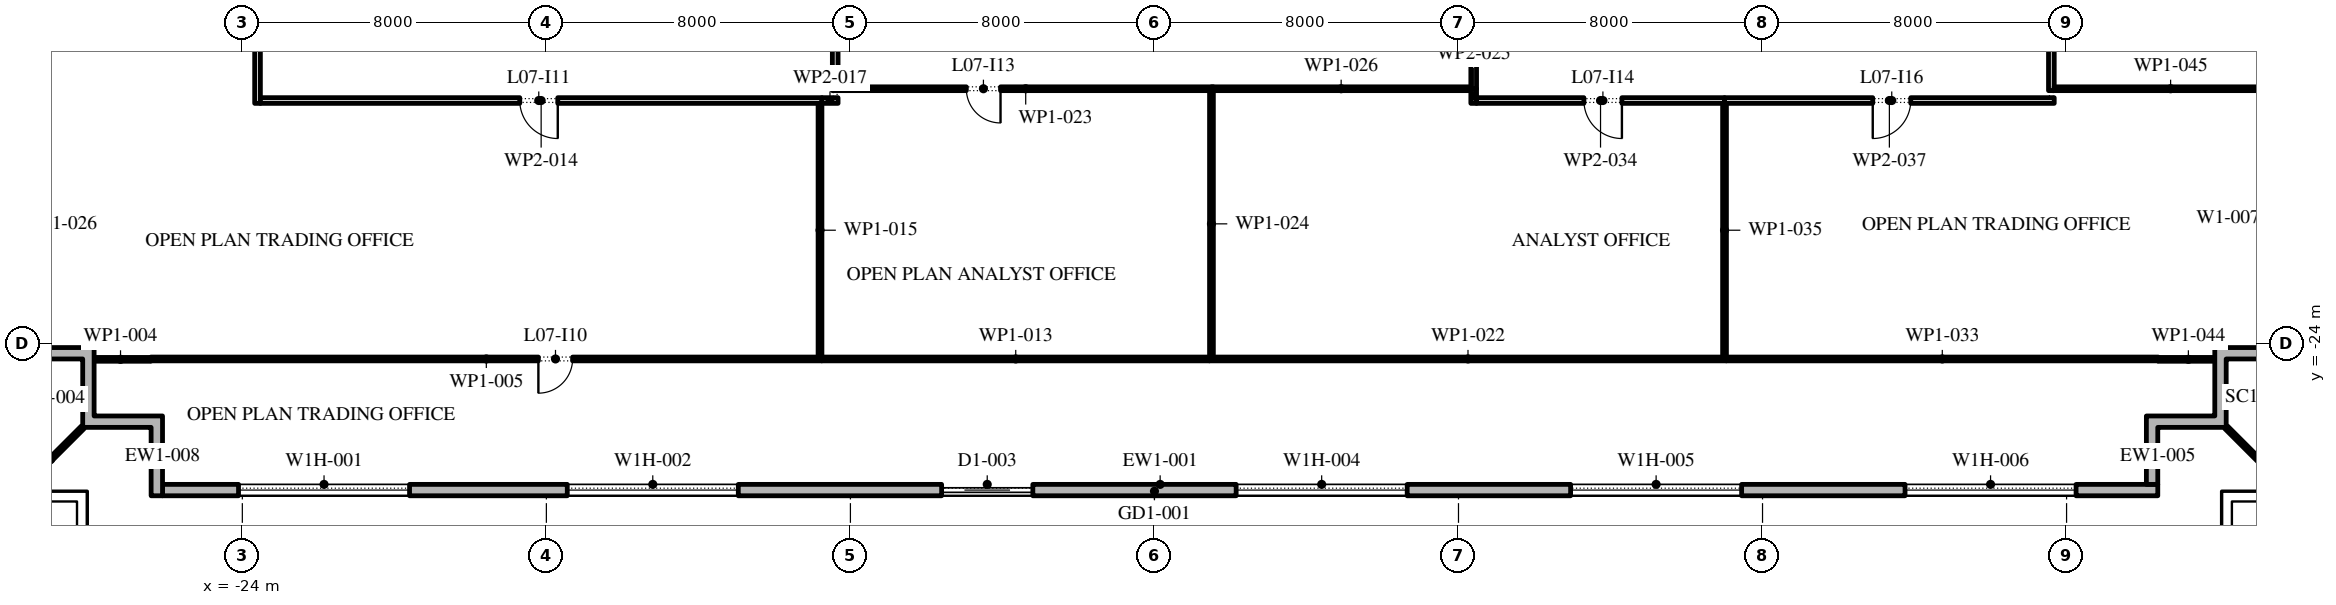
"""IFC4 building model, lengths in metres.
Left out: names, types, materials, properties, quantities, classifications, styles, units other than length and angle.
Written with IfcOpenShell. Run it as: python <this file> out.ifc"""

import sys

from ifc_helpers import new_model, si_unit, direction, frame, frame_2d, origin, place, context, subcontext, project, spatial, polyline, rectangle, outline, extrude, element, fill, save


model = new_model("IFC4")
c1 = context("Model", 3, precision=1e-05, world=origin(), true_north=direction((0.0, 1.0)))
c2 = subcontext(c1, "Body", "Model", "MODEL_VIEW")
j1 = project(units=[si_unit("LENGTHUNIT", "METRE"), si_unit("PLANEANGLEUNIT", "RADIAN")], contexts=[c1])
p1 = place(None, origin())
s1 = spatial("IfcSite", under=j1, at=p1, CompositionType="ELEMENT")
p2 = place(p1, origin())
s2 = spatial("IfcBuilding", under=s1, at=p2, CompositionType="ELEMENT")
p3 = place(p2, frame((0.0, 0.0, 39.6)))
s3 = spatial("IfcBuildingStorey", under=s2, at=p3, CompositionType="ELEMENT", Elevation=39.6)
p4 = place(p3, frame((-26.1, -27.85, 0.0), z_axis=(0.0, 0.0, 1.0), x_axis=(1.0, 0.0, 0.0)))
e1 = element("IfcWall", 1, at=p4, inside=s3, PredefinedType="STANDARD", context=c2, shape_type="SweptSolid", body=[
    extrude(rectangle(XDim=52.5, YDim=0.3, at=frame_2d((26.25, 0.0))), origin(), (0.0, 0.0, 1.0), 4.0),
])
p5 = place(p4, frame((2.0, 0.0, 0.45)))
e2 = element("IfcOpeningElement", 2, at=p5, cuts=e1, PredefinedType="OPENING", context=c2, shape_type="SweptSolid", body=[
    extrude(rectangle(XDim=4.5, YDim=2.75, at=frame_2d((2.25, 1.375))), frame((0.0, 0.16, 0.0), z_axis=(0.0, -1.0, 0.0), x_axis=(1.0, 0.0, 0.0)), (0.0, 0.0, 1.0), 0.32),
])
p6 = place(p4, frame((10.65, 0.0, 0.45)))
e3 = element("IfcOpeningElement", 3, at=p6, cuts=e1, PredefinedType="OPENING", context=c2, shape_type="SweptSolid", body=[
    extrude(rectangle(XDim=4.5, YDim=2.75, at=frame_2d((2.25, 1.375))), frame((0.0, 0.16, 0.0), z_axis=(0.0, -1.0, 0.0), x_axis=(1.0, 0.0, 0.0)), (0.0, 0.0, 1.0), 0.32),
])
p7 = place(p4, frame((20.5, 0.0, 0.0)))
e4 = element("IfcOpeningElement", 4, at=p7, cuts=e1, PredefinedType="OPENING", context=c2, shape_type="SweptSolid", body=[
    extrude(rectangle(XDim=2.4, YDim=3.5, at=frame_2d((1.2, 1.75))), frame((0.0, 0.16, 0.0), z_axis=(0.0, -1.0, 0.0), x_axis=(1.0, 0.0, 0.0)), (0.0, 0.0, 1.0), 0.32),
])
p8 = place(p4, frame((28.25, 0.0, 0.45)))
e5 = element("IfcOpeningElement", 5, at=p8, cuts=e1, PredefinedType="OPENING", context=c2, shape_type="SweptSolid", body=[
    extrude(rectangle(XDim=4.5, YDim=2.75, at=frame_2d((2.25, 1.375))), frame((0.0, 0.16, 0.0), z_axis=(0.0, -1.0, 0.0), x_axis=(1.0, 0.0, 0.0)), (0.0, 0.0, 1.0), 0.32),
])
p9 = place(p4, frame((37.05, 0.0, 0.45)))
e6 = element("IfcOpeningElement", 6, at=p9, cuts=e1, PredefinedType="OPENING", context=c2, shape_type="SweptSolid", body=[
    extrude(rectangle(XDim=4.5, YDim=2.75, at=frame_2d((2.25, 1.375))), frame((0.0, 0.16, 0.0), z_axis=(0.0, -1.0, 0.0), x_axis=(1.0, 0.0, 0.0)), (0.0, 0.0, 1.0), 0.32),
])
p10 = place(p4, frame((45.85, 0.0, 0.45)))
e7 = element("IfcOpeningElement", 7, at=p10, cuts=e1, PredefinedType="OPENING", context=c2, shape_type="SweptSolid", body=[
    extrude(rectangle(XDim=4.5, YDim=2.75, at=frame_2d((2.25, 1.375))), frame((0.0, 0.16, 0.0), z_axis=(0.0, -1.0, 0.0), x_axis=(1.0, 0.0, 0.0)), (0.0, 0.0, 1.0), 0.32),
])
p11 = place(p3, origin())
e8 = element("IfcWall", 8, at=p11, inside=s3, PredefinedType="STANDARD", context=c2, shape_type="SweptSolid", body=[
    extrude(outline(polyline([(27.9, -25.9), (27.9, -24.1), (30.0, -24.1), (30.0, -24.4), (28.2, -24.4), (28.2, -26.2), (26.4, -26.2), (26.4, -27.7), (26.1, -27.7), (26.1, -25.9), (27.9, -25.9)])), origin(), (0.0, 0.0, 1.0), 4.0),
])
p12 = place(p3, origin())
e9 = element("IfcWall", 9, at=p12, inside=s3, PredefinedType="STANDARD", context=c2, shape_type="SweptSolid", body=[
    extrude(outline(polyline([(-26.4, -26.2), (-28.2, -26.2), (-28.2, -24.4), (-29.7, -24.4), (-29.7, -24.1), (-27.9, -24.1), (-27.9, -25.9), (-26.1, -25.9), (-26.1, -28.0), (-26.4, -28.0), (-26.4, -26.2)])), origin(), (0.0, 0.0, 1.0), 4.0),
])
for number, where, z_axis, x_axis in (
    (10, (28.2, -26.2, -0.05), (0.0, 0.0, 1.0), (0.707, -0.707, 0.0)),
    (11, (-28.2, -26.2, -0.05), (0.0, 0.0, 1.0), (-0.707, -0.707, 0.0)),
):
    element("IfcWall", number, at=place(p3, frame(where, z_axis=z_axis, x_axis=x_axis)), inside=s3, PredefinedType="STANDARD", context=c2, shape_type="SweptSolid", body=[
        extrude(rectangle(XDim=2.385, YDim=0.1, at=frame_2d((1.192, 0.0))), origin(), (0.0, 0.0, 1.0), 4.05),
    ])
p13 = place(p3, frame((-28.0, -24.41, 0.0), z_axis=(0.0, 0.0, 1.0), x_axis=(1.0, 0.0, 0.0)))
e12 = element("IfcWall", 12, at=p13, inside=s3, PredefinedType="PARTITIONING", context=c2, shape_type="SweptSolid", body=[
    extrude(rectangle(XDim=1.59, YDim=0.1, at=frame_2d((0.795, 0.0))), origin(), (0.0, 0.0, 1.0), 4.0),
])
p14 = place(p3, frame((-26.41, -24.4, 0.0), z_axis=(0.0, 0.0, 1.0), x_axis=(1.0, 0.0, 0.0)))
e13 = element("IfcWall", 13, at=p14, inside=s3, PredefinedType="PARTITIONING", context=c2, shape_type="SweptSolid", body=[
    extrude(rectangle(XDim=17.66, YDim=0.1, at=frame_2d((8.83, 0.0))), origin(), (0.0, 0.0, 1.0), 4.0),
])
p15 = place(p14, frame((10.2, 0.0, 0.0)))
e14 = element("IfcOpeningElement", 14, at=p15, cuts=e13, PredefinedType="OPENING", context=c2, shape_type="SweptSolid", body=[
    extrude(rectangle(XDim=0.9, YDim=2.1, at=frame_2d((0.45, 1.05))), frame((0.0, 0.06, 0.0), z_axis=(0.0, -1.0, 0.0), x_axis=(1.0, 0.0, 0.0)), (0.0, 0.0, 1.0), 0.12),
])
p16 = place(p3, frame((-23.6, -17.675, 0.0), z_axis=(0.0, 0.0, 1.0), x_axis=(0.0, 1.0, 0.0)))
e15 = element("IfcWall", 15, at=p16, inside=s3, PredefinedType="PARTITIONING", context=c2, shape_type="SweptSolid", body=[
    extrude(rectangle(XDim=7.555, YDim=0.15, at=frame_2d((3.777, 0.0))), origin(), (0.0, 0.0, 1.0), 4.0),
])
p17 = place(p3, frame((-8.75, -24.4, 0.0), z_axis=(0.0, 0.0, 1.0), x_axis=(1.0, 0.0, 0.0)))
e16 = element("IfcWall", 16, at=p17, inside=s3, PredefinedType="PARTITIONING", context=c2, shape_type="SweptSolid", body=[
    extrude(rectangle(XDim=10.2, YDim=0.1, at=frame_2d((5.1, 0.0))), origin(), (0.0, 0.0, 1.0), 4.0),
])
p18 = place(p3, frame((-8.75, -17.6, 0.0), z_axis=(0.0, 0.0, 1.0), x_axis=(-1.0, 0.0, 0.0)))
e17 = element("IfcWall", 17, at=p18, inside=s3, PredefinedType="PARTITIONING", context=c2, shape_type="SweptSolid", body=[
    extrude(rectangle(XDim=14.775, YDim=0.15, at=frame_2d((7.387, 0.0))), origin(), (0.0, 0.0, 1.0), 4.0),
])
p19 = place(p18, frame((6.95, 0.0, 0.0)))
e18 = element("IfcOpeningElement", 18, at=p19, cuts=e17, PredefinedType="OPENING", context=c2, shape_type="SweptSolid", body=[
    extrude(rectangle(XDim=1.0, YDim=2.1, at=frame_2d((0.5, 1.05))), frame((0.0, 0.085, 0.0), z_axis=(0.0, -1.0, 0.0), x_axis=(1.0, 0.0, 0.0)), (0.0, 0.0, 1.0), 0.17),
])
p20 = place(p3, frame((-8.8, -17.675, 0.0), z_axis=(0.0, 0.0, 1.0), x_axis=(0.0, -1.0, 0.0)))
e19 = element("IfcWall", 19, at=p20, inside=s3, PredefinedType="PARTITIONING", context=c2, shape_type="SweptSolid", body=[
    extrude(rectangle(XDim=6.675, YDim=0.1, at=frame_2d((3.337, 0.0))), origin(), (0.0, 0.0, 1.0), 4.0),
])
p21 = place(p3, frame((-8.325, -17.6, 0.0), z_axis=(0.0, 0.0, 1.0), x_axis=(-1.0, 0.0, 0.0)))
e20 = element("IfcWall", 20, at=p21, inside=s3, PredefinedType="PARTITIONING", context=c2, shape_type="SweptSolid", body=[
    extrude(rectangle(XDim=0.425, YDim=0.15, at=frame_2d((0.212, 0.0))), origin(), (0.0, 0.0, 1.0), 4.0),
])
p22 = place(p3, frame((-8.4, -10.12, 0.0), z_axis=(0.0, 0.0, 1.0), x_axis=(0.0, -1.0, 0.0)))
e21 = element("IfcWall", 21, at=p22, inside=s3, PredefinedType="PARTITIONING", context=c2, shape_type="SweptSolid", body=[
    extrude(rectangle(XDim=7.22, YDim=0.15, at=frame_2d((3.61, 0.0))), origin(), (0.0, 0.0, 1.0), 4.0),
])
p23 = place(p22, frame((4.52, 0.0, 0.0)))
e22 = element("IfcOpeningElement", 22, at=p23, cuts=e21, PredefinedType="OPENING", context=c2, shape_type="SweptSolid", body=[
    extrude(rectangle(XDim=1.0, YDim=2.1, at=frame_2d((0.5, 1.05))), frame((0.0, 0.085, 0.0), z_axis=(0.0, -1.0, 0.0), x_axis=(1.0, 0.0, 0.0)), (0.0, 0.0, 1.0), 0.17),
])
p24 = place(p3, frame((1.45, -24.4, 0.0), z_axis=(0.0, 0.0, 1.0), x_axis=(1.0, 0.0, 0.0)))
e23 = element("IfcWall", 23, at=p24, inside=s3, PredefinedType="PARTITIONING", context=c2, shape_type="SweptSolid", body=[
    extrude(rectangle(XDim=13.6, YDim=0.1, at=frame_2d((6.8, 0.0))), origin(), (0.0, 0.0, 1.0), 4.0),
])
p25 = place(p3, frame((1.55, -17.29, 0.0), z_axis=(0.0, 0.0, 1.0), x_axis=(-1.0, 0.0, 0.0)))
e24 = element("IfcWall", 24, at=p25, inside=s3, PredefinedType="PARTITIONING", context=c2, shape_type="SweptSolid", body=[
    extrude(rectangle(XDim=9.875, YDim=0.1, at=frame_2d((4.938, 0.0))), origin(), (0.0, 0.0, 1.0), 4.0),
])
p26 = place(p25, frame((5.6, 0.0, 0.0)))
e25 = element("IfcOpeningElement", 25, at=p26, cuts=e24, PredefinedType="OPENING", context=c2, shape_type="SweptSolid", body=[
    extrude(rectangle(XDim=0.9, YDim=2.1, at=frame_2d((0.45, 1.05))), frame((0.0, 0.06, 0.0), z_axis=(0.0, -1.0, 0.0), x_axis=(1.0, 0.0, 0.0)), (0.0, 0.0, 1.0), 0.12),
])
p27 = place(p3, frame((1.5, -17.34, 0.0), z_axis=(0.0, 0.0, 1.0), x_axis=(0.0, -1.0, 0.0)))
e26 = element("IfcWall", 26, at=p27, inside=s3, PredefinedType="PARTITIONING", context=c2, shape_type="SweptSolid", body=[
    extrude(rectangle(XDim=7.01, YDim=0.1, at=frame_2d((3.505, 0.0))), origin(), (0.0, 0.0, 1.0), 4.0),
])
p28 = place(p3, frame((8.4, -17.675, 0.0), z_axis=(0.0, 0.0, 1.0), x_axis=(0.0, 1.0, 0.0)))
e27 = element("IfcWall", 27, at=p28, inside=s3, PredefinedType="PARTITIONING", context=c2, shape_type="SweptSolid", body=[
    extrude(rectangle(XDim=0.385, YDim=0.15, at=frame_2d((0.192, 0.0))), origin(), (0.0, 0.0, 1.0), 4.0),
])
p29 = place(p3, frame((8.325, -17.29, 0.0), z_axis=(0.0, 0.0, 1.0), x_axis=(-1.0, 0.0, 0.0)))
e28 = element("IfcWall", 28, at=p29, inside=s3, PredefinedType="PARTITIONING", context=c2, shape_type="SweptSolid", body=[
    extrude(rectangle(XDim=6.825, YDim=0.1, at=frame_2d((3.413, 0.0))), origin(), (0.0, 0.0, 1.0), 4.0),
])
p30 = place(p3, frame((8.4, -17.29, 0.0), z_axis=(0.0, 0.0, 1.0), x_axis=(0.0, 1.0, 0.0)))
e29 = element("IfcWall", 29, at=p30, inside=s3, PredefinedType="PARTITIONING", context=c2, shape_type="SweptSolid", body=[
    extrude(rectangle(XDim=7.17, YDim=0.15, at=frame_2d((3.585, 0.0))), origin(), (0.0, 0.0, 1.0), 4.0),
])
p31 = place(p3, frame((15.05, -24.4, 0.0), z_axis=(0.0, 0.0, 1.0), x_axis=(1.0, 0.0, 0.0)))
e30 = element("IfcWall", 30, at=p31, inside=s3, PredefinedType="PARTITIONING", context=c2, shape_type="SweptSolid", body=[
    extrude(rectangle(XDim=11.36, YDim=0.1, at=frame_2d((5.68, 0.0))), origin(), (0.0, 0.0, 1.0), 4.0),
])
p32 = place(p3, frame((15.0, -17.6, 0.0), z_axis=(0.0, 0.0, 1.0), x_axis=(-1.0, 0.0, 0.0)))
e31 = element("IfcWall", 31, at=p32, inside=s3, PredefinedType="PARTITIONING", context=c2, shape_type="SweptSolid", body=[
    extrude(rectangle(XDim=6.525, YDim=0.15, at=frame_2d((3.262, 0.0))), origin(), (0.0, 0.0, 1.0), 4.0),
])
p33 = place(p32, frame((2.7, 0.0, 0.0)))
e32 = element("IfcOpeningElement", 32, at=p33, cuts=e31, PredefinedType="OPENING", context=c2, shape_type="SweptSolid", body=[
    extrude(rectangle(XDim=1.0, YDim=2.1, at=frame_2d((0.5, 1.05))), frame((0.0, 0.085, 0.0), z_axis=(0.0, -1.0, 0.0), x_axis=(1.0, 0.0, 0.0)), (0.0, 0.0, 1.0), 0.17),
])
p34 = place(p3, frame((15.0, -17.675, 0.0), z_axis=(0.0, 0.0, 1.0), x_axis=(0.0, -1.0, 0.0)))
e33 = element("IfcWall", 33, at=p34, inside=s3, PredefinedType="PARTITIONING", context=c2, shape_type="SweptSolid", body=[
    extrude(rectangle(XDim=6.675, YDim=0.1, at=frame_2d((3.337, 0.0))), origin(), (0.0, 0.0, 1.0), 4.0),
])
p35 = place(p3, frame((23.675, -17.6, 0.0), z_axis=(0.0, 0.0, 1.0), x_axis=(-1.0, 0.0, 0.0)))
e34 = element("IfcWall", 34, at=p35, inside=s3, PredefinedType="PARTITIONING", context=c2, shape_type="SweptSolid", body=[
    extrude(rectangle(XDim=8.675, YDim=0.15, at=frame_2d((4.337, 0.0))), origin(), (0.0, 0.0, 1.0), 4.0),
])
p36 = place(p35, frame((3.775, 0.0, 0.0)))
e35 = element("IfcOpeningElement", 35, at=p36, cuts=e34, PredefinedType="OPENING", context=c2, shape_type="SweptSolid", body=[
    extrude(rectangle(XDim=1.0, YDim=2.1, at=frame_2d((0.5, 1.05))), frame((0.0, 0.085, 0.0), z_axis=(0.0, -1.0, 0.0), x_axis=(1.0, 0.0, 0.0)), (0.0, 0.0, 1.0), 0.17),
])
p37 = place(p3, frame((23.6, -10.22, 0.0), z_axis=(0.0, 0.0, 1.0), x_axis=(0.0, -1.0, 0.0)))
e36 = element("IfcWall", 36, at=p37, inside=s3, PredefinedType="PARTITIONING", context=c2, shape_type="SweptSolid", body=[
    extrude(rectangle(XDim=7.12, YDim=0.15, at=frame_2d((3.56, 0.0))), origin(), (0.0, 0.0, 1.0), 4.0),
])
p38 = place(p37, frame((2.42, 0.0, 0.0)))
e37 = element("IfcOpeningElement", 37, at=p38, cuts=e36, PredefinedType="OPENING", context=c2, shape_type="SweptSolid", body=[
    extrude(rectangle(XDim=1.0, YDim=2.1, at=frame_2d((0.5, 1.05))), frame((0.0, 0.085, 0.0), z_axis=(0.0, -1.0, 0.0), x_axis=(1.0, 0.0, 0.0)), (0.0, 0.0, 1.0), 0.17),
])
p39 = place(p3, frame((26.41, -24.41, 0.0), z_axis=(0.0, 0.0, 1.0), x_axis=(1.0, 0.0, 0.0)))
e38 = element("IfcWall", 38, at=p39, inside=s3, PredefinedType="PARTITIONING", context=c2, shape_type="SweptSolid", body=[
    extrude(rectangle(XDim=1.59, YDim=0.1, at=frame_2d((0.795, 0.0))), origin(), (0.0, 0.0, 1.0), 4.0),
])
p40 = place(p3, frame((29.8, -17.29, 0.0), z_axis=(0.0, 0.0, 1.0), x_axis=(-1.0, 0.0, 0.0)))
e39 = element("IfcWall", 39, at=p40, inside=s3, PredefinedType="PARTITIONING", context=c2, shape_type="SweptSolid", body=[
    extrude(rectangle(XDim=6.125, YDim=0.1, at=frame_2d((3.062, 0.0))), origin(), (0.0, 0.0, 1.0), 4.0),
])
p41 = place(p5, origin())
e40 = element("IfcWindow", 40, at=p41, inside=s3, PartitioningType="DOUBLE_PANEL_VERTICAL", PredefinedType="WINDOW", context=c2, shape_type="SweptSolid", body=[
    extrude(rectangle(XDim=4.5, YDim=2.75, at=frame_2d((2.25, 1.375))), frame((0.0, 0.03, 0.0), z_axis=(0.0, -1.0, 0.0), x_axis=(1.0, 0.0, 0.0)), (0.0, 0.0, 1.0), 0.06),
])
fill(e2, e40)
p42 = place(p6, origin())
e41 = element("IfcWindow", 41, at=p42, inside=s3, PartitioningType="DOUBLE_PANEL_VERTICAL", PredefinedType="WINDOW", context=c2, shape_type="SweptSolid", body=[
    extrude(rectangle(XDim=4.5, YDim=2.75, at=frame_2d((2.25, 1.375))), frame((0.0, 0.03, 0.0), z_axis=(0.0, -1.0, 0.0), x_axis=(1.0, 0.0, 0.0)), (0.0, 0.0, 1.0), 0.06),
])
fill(e3, e41)
p43 = place(p7, origin())
e42 = element("IfcDoor", 42, at=p43, inside=s3, OperationType="DOUBLE_DOOR_SLIDING", PredefinedType="DOOR", context=c2, shape_type="SweptSolid", body=[
    extrude(rectangle(XDim=2.4, YDim=3.5, at=frame_2d((1.2, 1.75))), frame((0.0, 0.025, 0.0), z_axis=(0.0, -1.0, 0.0), x_axis=(1.0, 0.0, 0.0)), (0.0, 0.0, 1.0), 0.05),
])
fill(e4, e42)
p44 = place(p8, origin())
e43 = element("IfcWindow", 43, at=p44, inside=s3, PartitioningType="DOUBLE_PANEL_VERTICAL", PredefinedType="WINDOW", context=c2, shape_type="SweptSolid", body=[
    extrude(rectangle(XDim=4.5, YDim=2.75, at=frame_2d((2.25, 1.375))), frame((0.0, 0.03, 0.0), z_axis=(0.0, -1.0, 0.0), x_axis=(1.0, 0.0, 0.0)), (0.0, 0.0, 1.0), 0.06),
])
fill(e5, e43)
p45 = place(p9, origin())
e44 = element("IfcWindow", 44, at=p45, inside=s3, PartitioningType="DOUBLE_PANEL_VERTICAL", PredefinedType="WINDOW", context=c2, shape_type="SweptSolid", body=[
    extrude(rectangle(XDim=4.5, YDim=2.75, at=frame_2d((2.25, 1.375))), frame((0.0, 0.03, 0.0), z_axis=(0.0, -1.0, 0.0), x_axis=(1.0, 0.0, 0.0)), (0.0, 0.0, 1.0), 0.06),
])
fill(e6, e44)
p46 = place(p10, origin())
e45 = element("IfcWindow", 45, at=p46, inside=s3, PartitioningType="DOUBLE_PANEL_VERTICAL", PredefinedType="WINDOW", context=c2, shape_type="SweptSolid", body=[
    extrude(rectangle(XDim=4.5, YDim=2.75, at=frame_2d((2.25, 1.375))), frame((0.0, 0.03, 0.0), z_axis=(0.0, -1.0, 0.0), x_axis=(1.0, 0.0, 0.0)), (0.0, 0.0, 1.0), 0.06),
])
fill(e7, e45)
p47 = place(p15, frame((0.9, 0.0, 0.0), z_axis=(0.0, 0.0, 1.0), x_axis=(-1.0, 0.0, 0.0)))
e46 = element("IfcDoor", 46, at=p47, inside=s3, OperationType="SINGLE_SWING_LEFT", PredefinedType="DOOR", context=c2, shape_type="SweptSolid", body=[
    extrude(rectangle(XDim=0.9, YDim=2.1, at=frame_2d((0.45, 1.05))), frame((0.0, 0.025, 0.0), z_axis=(0.0, -1.0, 0.0), x_axis=(1.0, 0.0, 0.0)), (0.0, 0.0, 1.0), 0.05),
])
fill(e14, e46)
p48 = place(p19, origin())
e47 = element("IfcDoor", 47, at=p48, inside=s3, OperationType="SINGLE_SWING_RIGHT", PredefinedType="DOOR", context=c2, shape_type="SweptSolid", body=[
    extrude(rectangle(XDim=1.0, YDim=2.1, at=frame_2d((0.5, 1.05))), frame((0.0, 0.025, 0.0), z_axis=(0.0, -1.0, 0.0), x_axis=(1.0, 0.0, 0.0)), (0.0, 0.0, 1.0), 0.05),
])
fill(e18, e47)
p49 = place(p26, origin())
e48 = element("IfcDoor", 48, at=p49, inside=s3, OperationType="SINGLE_SWING_RIGHT", PredefinedType="DOOR", context=c2, shape_type="SweptSolid", body=[
    extrude(rectangle(XDim=0.9, YDim=2.1, at=frame_2d((0.45, 1.05))), frame((0.0, 0.025, 0.0), z_axis=(0.0, -1.0, 0.0), x_axis=(1.0, 0.0, 0.0)), (0.0, 0.0, 1.0), 0.05),
])
fill(e25, e48)
p50 = place(p33, origin())
e49 = element("IfcDoor", 49, at=p50, inside=s3, OperationType="SINGLE_SWING_RIGHT", PredefinedType="DOOR", context=c2, shape_type="SweptSolid", body=[
    extrude(rectangle(XDim=1.0, YDim=2.1, at=frame_2d((0.5, 1.05))), frame((0.0, 0.025, 0.0), z_axis=(0.0, -1.0, 0.0), x_axis=(1.0, 0.0, 0.0)), (0.0, 0.0, 1.0), 0.05),
])
fill(e32, e49)
p51 = place(p36, origin())
e50 = element("IfcDoor", 50, at=p51, inside=s3, OperationType="SINGLE_SWING_LEFT", PredefinedType="DOOR", context=c2, shape_type="SweptSolid", body=[
    extrude(rectangle(XDim=1.0, YDim=2.1, at=frame_2d((0.5, 1.05))), frame((0.0, 0.025, 0.0), z_axis=(0.0, -1.0, 0.0), x_axis=(1.0, 0.0, 0.0)), (0.0, 0.0, 1.0), 0.05),
])
fill(e35, e50)
save(model, sys.argv[1])
